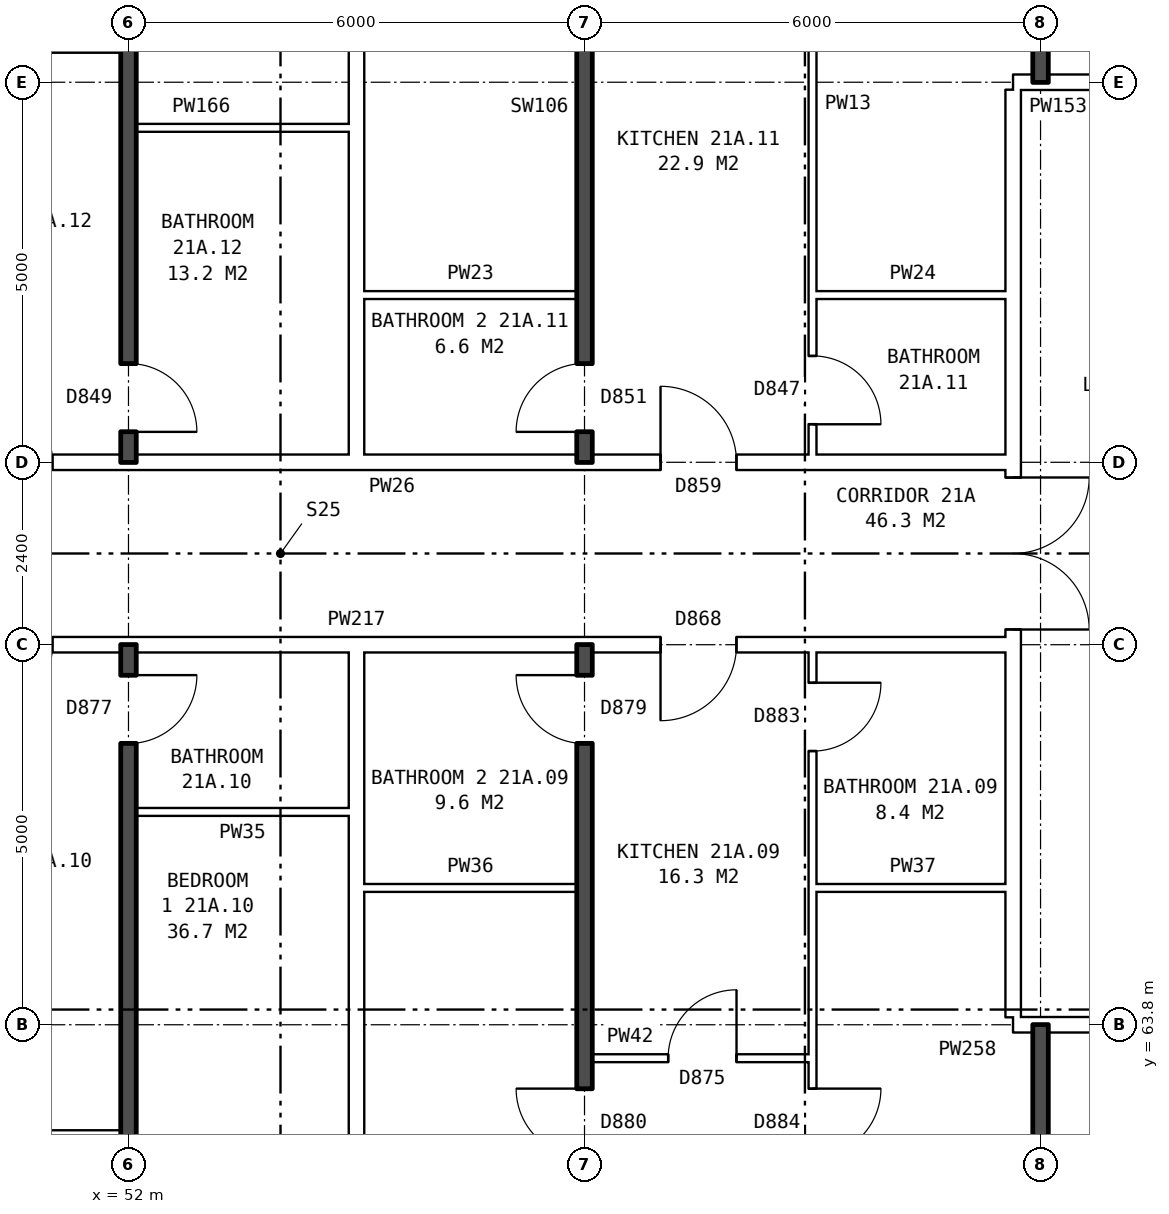
"""IFC4 building model, lengths in metres.
Left out: names, types, materials, properties, quantities, classifications, styles, units other than length and angle.
Written with IfcOpenShell. Run it as: python <this file> out.ifc"""

import sys

from ifc_helpers import new_model, si_unit, direction, frame, frame_2d, origin, place, context, subcontext, project, spatial, rectangle, extrude, element, fill, save


model = new_model("IFC4")
c1 = context("Model", 3, precision=1e-05, world=origin(), true_north=direction((0.0, 1.0)))
c2 = subcontext(c1, "Body", "Model", "MODEL_VIEW")
j1 = project(units=[si_unit("LENGTHUNIT", "METRE"), si_unit("PLANEANGLEUNIT", "RADIAN")], contexts=[c1])
p1 = place(None, origin())
s1 = spatial("IfcSite", under=j1, at=p1, CompositionType="ELEMENT")
p2 = place(p1, origin())
s2 = spatial("IfcBuilding", under=s1, at=p2, CompositionType="ELEMENT")
p3 = place(p2, frame((0.0, 0.0, 77.8)))
s3 = spatial("IfcBuildingStorey", under=s2, at=p3, CompositionType="ELEMENT", Elevation=77.8)
p4 = place(p3, frame((63.64, 63.9, 0.0), z_axis=(0.0, 0.0, 1.0), x_axis=(0.0, 1.0, 0.0)))
e1 = element("IfcWall", 1, at=p4, inside=s3, PredefinedType="PARTITIONING", context=c2, shape_type="SweptSolid", body=[
    extrude(rectangle(XDim=12.2, YDim=0.2, at=frame_2d((6.1, 0.0))), origin(), (0.0, 0.0, 1.0), 2.85),
])
p5 = place(p4, frame((5.1, 0.0, 0.0)))
e2 = element("IfcOpeningElement", 2, at=p5, cuts=e1, PredefinedType="OPENING", context=c2, shape_type="SweptSolid", body=[
    extrude(rectangle(XDim=2.0, YDim=2.1, at=frame_2d((1.0, 1.05))), frame((0.0, 0.11, 0.0), z_axis=(0.0, -1.0, 0.0), x_axis=(1.0, 0.0, 0.0)), (0.0, 0.0, 1.0), 0.22),
])
p6 = place(p3, frame((49.0, 62.36, 0.0), z_axis=(0.0, 0.0, 1.0), x_axis=(1.0, 0.0, 0.0)))
e3 = element("IfcWall", 3, at=p6, inside=s3, PredefinedType="PARTITIONING", context=c2, shape_type="SweptSolid", body=[
    extrude(rectangle(XDim=2.9, YDim=0.1, at=frame_2d((1.45, 0.0))), origin(), (0.0, 0.0, 1.0), 2.85),
])
p7 = place(p6, frame((1.0, 0.0, 0.0)))
e4 = element("IfcOpeningElement", 4, at=p7, cuts=e3, PredefinedType="OPENING", context=c2, shape_type="SweptSolid", body=[
    extrude(rectangle(XDim=0.9, YDim=2.1, at=frame_2d((0.45, 1.05))), frame((0.0, 0.06, 0.0), z_axis=(0.0, -1.0, 0.0), x_axis=(1.0, 0.0, 0.0)), (0.0, 0.0, 1.0), 0.12),
])
p8 = place(p3, frame((58.1, 63.36, 0.0), z_axis=(0.0, 0.0, 1.0), x_axis=(1.0, 0.0, 0.0)))
e5 = element("IfcWall", 5, at=p8, inside=s3, PredefinedType="PARTITIONING", context=c2, shape_type="SweptSolid", body=[
    extrude(rectangle(XDim=2.9, YDim=0.1, at=frame_2d((1.45, 0.0))), origin(), (0.0, 0.0, 1.0), 2.85),
])
p9 = place(p8, frame((1.0, 0.0, 0.0)))
e6 = element("IfcOpeningElement", 6, at=p9, cuts=e5, PredefinedType="OPENING", context=c2, shape_type="SweptSolid", body=[
    extrude(rectangle(XDim=0.9, YDim=2.1, at=frame_2d((0.45, 1.05))), frame((0.0, 0.06, 0.0), z_axis=(0.0, -1.0, 0.0), x_axis=(1.0, 0.0, 0.0)), (0.0, 0.0, 1.0), 0.12),
])
p10 = place(p3, frame((63.64, 63.8, 0.0), z_axis=(0.0, 0.0, 1.0), x_axis=(1.0, 0.0, 0.0)))
e7 = element("IfcWall", 7, at=p10, inside=s3, PredefinedType="PARTITIONING", context=c2, shape_type="SweptSolid", body=[
    extrude(rectangle(XDim=3.0, YDim=0.2, at=frame_2d((1.5, 0.0))), origin(), (0.0, 0.0, 1.0), 2.85),
])
p11 = place(p10, frame((1.18, 0.0, 0.0)))
e8 = element("IfcOpeningElement", 8, at=p11, cuts=e7, PredefinedType="OPENING", context=c2, shape_type="SweptSolid", body=[
    extrude(rectangle(XDim=1.0, YDim=2.1, at=frame_2d((0.5, 1.05))), frame((0.0, 0.11, 0.0), z_axis=(0.0, -1.0, 0.0), x_axis=(1.0, 0.0, 0.0)), (0.0, 0.0, 1.0), 0.22),
])
p12 = place(p3, frame((55.1, 65.6, 0.0), z_axis=(0.0, 0.0, 1.0), x_axis=(1.0, 0.0, 0.0)))
e9 = element("IfcWall", 9, at=p12, inside=s3, PredefinedType="PARTITIONING", context=c2, shape_type="SweptSolid", body=[
    extrude(rectangle(XDim=2.8, YDim=0.1, at=frame_2d((1.4, 0.0))), origin(), (0.0, 0.0, 1.0), 2.85),
])
p13 = place(p3, frame((61.0, 65.6, 0.0), z_axis=(0.0, 0.0, 1.0), x_axis=(1.0, 0.0, 0.0)))
e10 = element("IfcWall", 10, at=p13, inside=s3, PredefinedType="PARTITIONING", context=c2, shape_type="SweptSolid", body=[
    extrude(rectangle(XDim=2.64, YDim=0.1, at=frame_2d((1.32, 0.0))), origin(), (0.0, 0.0, 1.0), 2.85),
])
p14 = place(p3, frame((52.1, 66.6, 0.0), z_axis=(0.0, 0.0, 1.0), x_axis=(1.0, 0.0, 0.0)))
e11 = element("IfcWall", 11, at=p14, inside=s3, PredefinedType="PARTITIONING", context=c2, shape_type="SweptSolid", body=[
    extrude(rectangle(XDim=2.8, YDim=0.1, at=frame_2d((1.4, 0.0))), origin(), (0.0, 0.0, 1.0), 2.85),
])
p15 = place(p3, frame((44.36, 68.8, 0.0), z_axis=(0.0, 0.0, 1.0), x_axis=(1.0, 0.0, 0.0)))
e12 = element("IfcWall", 12, at=p15, inside=s3, PredefinedType="PARTITIONING", context=c2, shape_type="SweptSolid", body=[
    extrude(rectangle(XDim=19.28, YDim=0.2, at=frame_2d((9.64, 0.0))), origin(), (0.0, 0.0, 1.0), 2.85),
])
p16 = place(p15, frame((14.64, 0.0, 0.0)))
e13 = element("IfcOpeningElement", 13, at=p16, cuts=e12, PredefinedType="OPENING", context=c2, shape_type="SweptSolid", body=[
    extrude(rectangle(XDim=1.0, YDim=2.1, at=frame_2d((0.5, 1.05))), frame((0.0, 0.11, 0.0), z_axis=(0.0, -1.0, 0.0), x_axis=(1.0, 0.0, 0.0)), (0.0, 0.0, 1.0), 0.22),
])
p17 = place(p15, frame((5.64, 0.0, 0.0)))
e14 = element("IfcOpeningElement", 14, at=p17, cuts=e12, PredefinedType="OPENING", context=c2, shape_type="SweptSolid", body=[
    extrude(rectangle(XDim=1.0, YDim=2.1, at=frame_2d((0.5, 1.05))), frame((0.0, 0.11, 0.0), z_axis=(0.0, -1.0, 0.0), x_axis=(1.0, 0.0, 0.0)), (0.0, 0.0, 1.0), 0.22),
])
p18 = place(p3, frame((44.36, 71.2, 0.0), z_axis=(0.0, 0.0, 1.0), x_axis=(1.0, 0.0, 0.0)))
e15 = element("IfcWall", 15, at=p18, inside=s3, PredefinedType="PARTITIONING", context=c2, shape_type="SweptSolid", body=[
    extrude(rectangle(XDim=19.28, YDim=0.2, at=frame_2d((9.64, 0.0))), origin(), (0.0, 0.0, 1.0), 2.85),
])
p19 = place(p18, frame((14.64, 0.0, 0.0)))
e16 = element("IfcOpeningElement", 16, at=p19, cuts=e15, PredefinedType="OPENING", context=c2, shape_type="SweptSolid", body=[
    extrude(rectangle(XDim=1.0, YDim=2.1, at=frame_2d((0.5, 1.05))), frame((0.0, 0.11, 0.0), z_axis=(0.0, -1.0, 0.0), x_axis=(1.0, 0.0, 0.0)), (0.0, 0.0, 1.0), 0.22),
])
p20 = place(p18, frame((5.64, 0.0, 0.0)))
e17 = element("IfcOpeningElement", 17, at=p20, cuts=e15, PredefinedType="OPENING", context=c2, shape_type="SweptSolid", body=[
    extrude(rectangle(XDim=1.0, YDim=2.1, at=frame_2d((0.5, 1.05))), frame((0.0, 0.11, 0.0), z_axis=(0.0, -1.0, 0.0), x_axis=(1.0, 0.0, 0.0)), (0.0, 0.0, 1.0), 0.22),
])
p21 = place(p3, frame((55.1, 73.4, 0.0), z_axis=(0.0, 0.0, 1.0), x_axis=(1.0, 0.0, 0.0)))
e18 = element("IfcWall", 18, at=p21, inside=s3, PredefinedType="PARTITIONING", context=c2, shape_type="SweptSolid", body=[
    extrude(rectangle(XDim=2.8, YDim=0.1, at=frame_2d((1.4, 0.0))), origin(), (0.0, 0.0, 1.0), 2.85),
])
p22 = place(p3, frame((61.0, 73.4, 0.0), z_axis=(0.0, 0.0, 1.0), x_axis=(1.0, 0.0, 0.0)))
e19 = element("IfcWall", 19, at=p22, inside=s3, PredefinedType="PARTITIONING", context=c2, shape_type="SweptSolid", body=[
    extrude(rectangle(XDim=2.64, YDim=0.1, at=frame_2d((1.32, 0.0))), origin(), (0.0, 0.0, 1.0), 2.85),
])
p23 = place(p3, frame((52.1, 75.6, 0.0), z_axis=(0.0, 0.0, 1.0), x_axis=(1.0, 0.0, 0.0)))
e20 = element("IfcWall", 20, at=p23, inside=s3, PredefinedType="PARTITIONING", context=c2, shape_type="SweptSolid", body=[
    extrude(rectangle(XDim=2.8, YDim=0.1, at=frame_2d((1.4, 0.0))), origin(), (0.0, 0.0, 1.0), 2.85),
])
p24 = place(p3, frame((63.64, 76.2, 0.0), z_axis=(0.0, 0.0, 1.0), x_axis=(1.0, 0.0, 0.0)))
e21 = element("IfcWall", 21, at=p24, inside=s3, PredefinedType="PARTITIONING", context=c2, shape_type="SweptSolid", body=[
    extrude(rectangle(XDim=3.0, YDim=0.2, at=frame_2d((1.5, 0.0))), origin(), (0.0, 0.0, 1.0), 2.85),
])
p25 = place(p24, frame((1.18, 0.0, 0.0)))
e22 = element("IfcOpeningElement", 22, at=p25, cuts=e21, PredefinedType="OPENING", context=c2, shape_type="SweptSolid", body=[
    extrude(rectangle(XDim=1.0, YDim=2.1, at=frame_2d((0.5, 1.05))), frame((0.0, 0.11, 0.0), z_axis=(0.0, -1.0, 0.0), x_axis=(1.0, 0.0, 0.0)), (0.0, 0.0, 1.0), 0.22),
])
p26 = place(p3, frame((49.0, 76.64, 0.0), z_axis=(0.0, 0.0, 1.0), x_axis=(1.0, 0.0, 0.0)))
e23 = element("IfcWall", 23, at=p26, inside=s3, PredefinedType="PARTITIONING", context=c2, shape_type="SweptSolid", body=[
    extrude(rectangle(XDim=2.9, YDim=0.1, at=frame_2d((1.45, 0.0))), origin(), (0.0, 0.0, 1.0), 2.85),
])
p27 = place(p26, frame((1.0, 0.0, 0.0)))
e24 = element("IfcOpeningElement", 24, at=p27, cuts=e23, PredefinedType="OPENING", context=c2, shape_type="SweptSolid", body=[
    extrude(rectangle(XDim=0.9, YDim=2.1, at=frame_2d((0.45, 1.05))), frame((0.0, 0.06, 0.0), z_axis=(0.0, -1.0, 0.0), x_axis=(1.0, 0.0, 0.0)), (0.0, 0.0, 1.0), 0.12),
])
p28 = place(p3, frame((52.0, 54.36, 0.0), z_axis=(0.0, 0.0, 1.0), x_axis=(0.0, 1.0, 0.0)))
e25 = element("IfcWall", 25, at=p28, inside=s3, PredefinedType="SOLIDWALL", context=c2, shape_type="SweptSolid", body=[
    extrude(rectangle(XDim=14.44, YDim=0.2, at=frame_2d((7.22, 0.0))), origin(), (0.0, 0.0, 1.0), 2.85),
])
p29 = place(p28, frame((6.7, 0.0, 0.0)))
e26 = element("IfcOpeningElement", 26, at=p29, cuts=e25, PredefinedType="OPENING", context=c2, shape_type="SweptSolid", body=[
    extrude(rectangle(XDim=0.9, YDim=2.1, at=frame_2d((0.45, 1.05))), frame((0.0, 0.11, 0.0), z_axis=(0.0, -1.0, 0.0), x_axis=(1.0, 0.0, 0.0)), (0.0, 0.0, 1.0), 0.22),
])
p30 = place(p28, frame((13.14, 0.0, 0.0)))
e27 = element("IfcOpeningElement", 27, at=p30, cuts=e25, PredefinedType="OPENING", context=c2, shape_type="SweptSolid", body=[
    extrude(rectangle(XDim=0.9, YDim=2.1, at=frame_2d((0.45, 1.05))), frame((0.0, 0.11, 0.0), z_axis=(0.0, -1.0, 0.0), x_axis=(1.0, 0.0, 0.0)), (0.0, 0.0, 1.0), 0.22),
])
p31 = place(p3, frame((52.0, 71.2, 0.0), z_axis=(0.0, 0.0, 1.0), x_axis=(0.0, 1.0, 0.0)))
e28 = element("IfcWall", 28, at=p31, inside=s3, PredefinedType="SOLIDWALL", context=c2, shape_type="SweptSolid", body=[
    extrude(rectangle(XDim=14.44, YDim=0.2, at=frame_2d((7.22, 0.0))), origin(), (0.0, 0.0, 1.0), 2.85),
])
p32 = place(p31, frame((5.84, 0.0, 0.0)))
e29 = element("IfcOpeningElement", 29, at=p32, cuts=e28, PredefinedType="OPENING", context=c2, shape_type="SweptSolid", body=[
    extrude(rectangle(XDim=0.9, YDim=2.1, at=frame_2d((0.45, 1.05))), frame((0.0, 0.11, 0.0), z_axis=(0.0, -1.0, 0.0), x_axis=(1.0, 0.0, 0.0)), (0.0, 0.0, 1.0), 0.22),
])
p33 = place(p31, frame((0.4, 0.0, 0.0)))
e30 = element("IfcOpeningElement", 30, at=p33, cuts=e28, PredefinedType="OPENING", context=c2, shape_type="SweptSolid", body=[
    extrude(rectangle(XDim=0.9, YDim=2.1, at=frame_2d((0.45, 1.05))), frame((0.0, 0.11, 0.0), z_axis=(0.0, -1.0, 0.0), x_axis=(1.0, 0.0, 0.0)), (0.0, 0.0, 1.0), 0.22),
])
for number, where, z_axis, x_axis in (
    (31, (55.0, 54.36, 0.0), (0.0, 0.0, 1.0), (0.0, 1.0, 0.0)),
    (32, (55.0, 71.3, 0.0), (0.0, 0.0, 1.0), (0.0, 1.0, 0.0)),
):
    element("IfcWall", number, at=place(p3, frame(where, z_axis=z_axis, x_axis=x_axis)), inside=s3, PredefinedType="PARTITIONING", context=c2, shape_type="SweptSolid", body=[
        extrude(rectangle(XDim=14.34, YDim=0.2, at=frame_2d((7.17, 0.0))), origin(), (0.0, 0.0, 1.0), 2.85),
    ])
p34 = place(p3, frame((58.0, 54.36, 0.0), z_axis=(0.0, 0.0, 1.0), x_axis=(0.0, 1.0, 0.0)))
e33 = element("IfcWall", 33, at=p34, inside=s3, PredefinedType="SOLIDWALL", context=c2, shape_type="SweptSolid", body=[
    extrude(rectangle(XDim=14.44, YDim=0.2, at=frame_2d((7.22, 0.0))), origin(), (0.0, 0.0, 1.0), 2.85),
])
p35 = place(p34, frame((7.7, 0.0, 0.0)))
e34 = element("IfcOpeningElement", 34, at=p35, cuts=e33, PredefinedType="OPENING", context=c2, shape_type="SweptSolid", body=[
    extrude(rectangle(XDim=0.9, YDim=2.1, at=frame_2d((0.45, 1.05))), frame((0.0, 0.11, 0.0), z_axis=(0.0, -1.0, 0.0), x_axis=(1.0, 0.0, 0.0)), (0.0, 0.0, 1.0), 0.22),
])
p36 = place(p34, frame((13.14, 0.0, 0.0)))
e35 = element("IfcOpeningElement", 35, at=p36, cuts=e33, PredefinedType="OPENING", context=c2, shape_type="SweptSolid", body=[
    extrude(rectangle(XDim=0.9, YDim=2.1, at=frame_2d((0.45, 1.05))), frame((0.0, 0.11, 0.0), z_axis=(0.0, -1.0, 0.0), x_axis=(1.0, 0.0, 0.0)), (0.0, 0.0, 1.0), 0.22),
])
p37 = place(p3, frame((58.0, 71.2, 0.0), z_axis=(0.0, 0.0, 1.0), x_axis=(0.0, 1.0, 0.0)))
e36 = element("IfcWall", 36, at=p37, inside=s3, PredefinedType="SOLIDWALL", context=c2, shape_type="SweptSolid", body=[
    extrude(rectangle(XDim=14.44, YDim=0.2, at=frame_2d((7.22, 0.0))), origin(), (0.0, 0.0, 1.0), 2.85),
])
p38 = place(p37, frame((8.04, 0.0, 0.0)))
e37 = element("IfcOpeningElement", 37, at=p38, cuts=e36, PredefinedType="OPENING", context=c2, shape_type="SweptSolid", body=[
    extrude(rectangle(XDim=0.9, YDim=2.1, at=frame_2d((0.45, 1.05))), frame((0.0, 0.11, 0.0), z_axis=(0.0, -1.0, 0.0), x_axis=(1.0, 0.0, 0.0)), (0.0, 0.0, 1.0), 0.22),
])
p39 = place(p37, frame((0.4, 0.0, 0.0)))
e38 = element("IfcOpeningElement", 38, at=p39, cuts=e36, PredefinedType="OPENING", context=c2, shape_type="SweptSolid", body=[
    extrude(rectangle(XDim=0.9, YDim=2.1, at=frame_2d((0.45, 1.05))), frame((0.0, 0.11, 0.0), z_axis=(0.0, -1.0, 0.0), x_axis=(1.0, 0.0, 0.0)), (0.0, 0.0, 1.0), 0.22),
])
p40 = place(p3, frame((61.0, 54.36, 0.0), z_axis=(0.0, 0.0, 1.0), x_axis=(0.0, 1.0, 0.0)))
e39 = element("IfcWall", 39, at=p40, inside=s3, PredefinedType="PARTITIONING", context=c2, shape_type="SweptSolid", body=[
    extrude(rectangle(XDim=14.34, YDim=0.1, at=frame_2d((7.17, 0.0))), origin(), (0.0, 0.0, 1.0), 2.85),
])
p41 = place(p40, frame((7.7, 0.0, 0.0)))
e40 = element("IfcOpeningElement", 40, at=p41, cuts=e39, PredefinedType="OPENING", context=c2, shape_type="SweptSolid", body=[
    extrude(rectangle(XDim=0.9, YDim=2.1, at=frame_2d((0.45, 1.05))), frame((0.0, 0.06, 0.0), z_axis=(0.0, -1.0, 0.0), x_axis=(1.0, 0.0, 0.0)), (0.0, 0.0, 1.0), 0.12),
])
p42 = place(p40, frame((13.04, 0.0, 0.0)))
e41 = element("IfcOpeningElement", 41, at=p42, cuts=e39, PredefinedType="OPENING", context=c2, shape_type="SweptSolid", body=[
    extrude(rectangle(XDim=0.9, YDim=2.1, at=frame_2d((0.45, 1.05))), frame((0.0, 0.06, 0.0), z_axis=(0.0, -1.0, 0.0), x_axis=(1.0, 0.0, 0.0)), (0.0, 0.0, 1.0), 0.12),
])
p43 = place(p3, frame((61.0, 71.3, 0.0), z_axis=(0.0, 0.0, 1.0), x_axis=(0.0, 1.0, 0.0)))
e42 = element("IfcWall", 42, at=p43, inside=s3, PredefinedType="PARTITIONING", context=c2, shape_type="SweptSolid", body=[
    extrude(rectangle(XDim=14.34, YDim=0.1, at=frame_2d((7.17, 0.0))), origin(), (0.0, 0.0, 1.0), 2.85),
])
p44 = place(p43, frame((7.94, 0.0, 0.0)))
e43 = element("IfcOpeningElement", 43, at=p44, cuts=e42, PredefinedType="OPENING", context=c2, shape_type="SweptSolid", body=[
    extrude(rectangle(XDim=0.9, YDim=2.1, at=frame_2d((0.45, 1.05))), frame((0.0, 0.06, 0.0), z_axis=(0.0, -1.0, 0.0), x_axis=(1.0, 0.0, 0.0)), (0.0, 0.0, 1.0), 0.12),
])
p45 = place(p43, frame((0.4, 0.0, 0.0)))
e44 = element("IfcOpeningElement", 44, at=p45, cuts=e42, PredefinedType="OPENING", context=c2, shape_type="SweptSolid", body=[
    extrude(rectangle(XDim=0.9, YDim=2.1, at=frame_2d((0.45, 1.05))), frame((0.0, 0.06, 0.0), z_axis=(0.0, -1.0, 0.0), x_axis=(1.0, 0.0, 0.0)), (0.0, 0.0, 1.0), 0.12),
])
for number, where, z_axis, x_axis in (
    (45, (64.0, 54.36, 0.0), (0.0, 0.0, 1.0), (0.0, 1.0, 0.0)),
    (46, (64.0, 76.2, 0.0), (0.0, 0.0, 1.0), (0.0, 1.0, 0.0)),
):
    element("IfcWall", number, at=place(p3, frame(where, z_axis=z_axis, x_axis=x_axis)), inside=s3, PredefinedType="SOLIDWALL", context=c2, shape_type="SweptSolid", body=[
        extrude(rectangle(XDim=9.44, YDim=0.2, at=frame_2d((4.72, 0.0))), origin(), (0.0, 0.0, 1.0), 2.85),
    ])
p46 = place(p5, frame((2.0, 0.0, 0.0), z_axis=(0.0, 0.0, 1.0), x_axis=(-1.0, 0.0, 0.0)))
e47 = element("IfcDoor", 47, at=p46, inside=s3, OperationType="DOUBLE_DOOR_SINGLE_SWING", PredefinedType="DOOR", context=c2, shape_type="SweptSolid", body=[
    extrude(rectangle(XDim=2.0, YDim=2.1, at=frame_2d((1.0, 1.05))), frame((0.0, 0.025, 0.0), z_axis=(0.0, -1.0, 0.0), x_axis=(1.0, 0.0, 0.0)), (0.0, 0.0, 1.0), 0.05),
])
fill(e2, e47)
p47 = place(p41, frame((0.9, 0.0, 0.0), z_axis=(0.0, 0.0, 1.0), x_axis=(-1.0, 0.0, 0.0)))
e48 = element("IfcDoor", 48, at=p47, inside=s3, OperationType="SINGLE_SWING_LEFT", PredefinedType="DOOR", context=c2, shape_type="SweptSolid", body=[
    extrude(rectangle(XDim=0.9, YDim=2.1, at=frame_2d((0.45, 1.05))), frame((0.0, 0.025, 0.0), z_axis=(0.0, -1.0, 0.0), x_axis=(1.0, 0.0, 0.0)), (0.0, 0.0, 1.0), 0.05),
])
fill(e40, e48)
p48 = place(p35, origin())
e49 = element("IfcDoor", 49, at=p48, inside=s3, OperationType="SINGLE_SWING_RIGHT", PredefinedType="DOOR", context=c2, shape_type="SweptSolid", body=[
    extrude(rectangle(XDim=0.9, YDim=2.1, at=frame_2d((0.45, 1.05))), frame((0.0, 0.025, 0.0), z_axis=(0.0, -1.0, 0.0), x_axis=(1.0, 0.0, 0.0)), (0.0, 0.0, 1.0), 0.05),
])
fill(e34, e49)
p49 = place(p16, frame((1.0, 0.0, 0.0), z_axis=(0.0, 0.0, 1.0), x_axis=(-1.0, 0.0, 0.0)))
e50 = element("IfcDoor", 50, at=p49, inside=s3, OperationType="SINGLE_SWING_RIGHT", PredefinedType="DOOR", context=c2, shape_type="SweptSolid", body=[
    extrude(rectangle(XDim=1.0, YDim=2.1, at=frame_2d((0.5, 1.05))), frame((0.0, 0.025, 0.0), z_axis=(0.0, -1.0, 0.0), x_axis=(1.0, 0.0, 0.0)), (0.0, 0.0, 1.0), 0.05),
])
fill(e13, e50)
p50 = place(p9, origin())
e51 = element("IfcDoor", 51, at=p50, inside=s3, OperationType="SINGLE_SWING_RIGHT", PredefinedType="DOOR", context=c2, shape_type="SweptSolid", body=[
    extrude(rectangle(XDim=0.9, YDim=2.1, at=frame_2d((0.45, 1.05))), frame((0.0, 0.025, 0.0), z_axis=(0.0, -1.0, 0.0), x_axis=(1.0, 0.0, 0.0)), (0.0, 0.0, 1.0), 0.05),
])
fill(e6, e51)
p51 = place(p42, frame((0.9, 0.0, 0.0), z_axis=(0.0, 0.0, 1.0), x_axis=(-1.0, 0.0, 0.0)))
e52 = element("IfcDoor", 52, at=p51, inside=s3, OperationType="SINGLE_SWING_LEFT", PredefinedType="DOOR", context=c2, shape_type="SweptSolid", body=[
    extrude(rectangle(XDim=0.9, YDim=2.1, at=frame_2d((0.45, 1.05))), frame((0.0, 0.025, 0.0), z_axis=(0.0, -1.0, 0.0), x_axis=(1.0, 0.0, 0.0)), (0.0, 0.0, 1.0), 0.05),
])
fill(e41, e52)
p52 = place(p36, origin())
e53 = element("IfcDoor", 53, at=p52, inside=s3, OperationType="SINGLE_SWING_RIGHT", PredefinedType="DOOR", context=c2, shape_type="SweptSolid", body=[
    extrude(rectangle(XDim=0.9, YDim=2.1, at=frame_2d((0.45, 1.05))), frame((0.0, 0.025, 0.0), z_axis=(0.0, -1.0, 0.0), x_axis=(1.0, 0.0, 0.0)), (0.0, 0.0, 1.0), 0.05),
])
fill(e35, e53)
p53 = place(p30, frame((0.9, 0.0, 0.0), z_axis=(0.0, 0.0, 1.0), x_axis=(-1.0, 0.0, 0.0)))
e54 = element("IfcDoor", 54, at=p53, inside=s3, OperationType="SINGLE_SWING_LEFT", PredefinedType="DOOR", context=c2, shape_type="SweptSolid", body=[
    extrude(rectangle(XDim=0.9, YDim=2.1, at=frame_2d((0.45, 1.05))), frame((0.0, 0.025, 0.0), z_axis=(0.0, -1.0, 0.0), x_axis=(1.0, 0.0, 0.0)), (0.0, 0.0, 1.0), 0.05),
])
fill(e27, e54)
p54 = place(p19, origin())
e55 = element("IfcDoor", 55, at=p54, inside=s3, OperationType="SINGLE_SWING_LEFT", PredefinedType="DOOR", context=c2, shape_type="SweptSolid", body=[
    extrude(rectangle(XDim=1.0, YDim=2.1, at=frame_2d((0.5, 1.05))), frame((0.0, 0.025, 0.0), z_axis=(0.0, -1.0, 0.0), x_axis=(1.0, 0.0, 0.0)), (0.0, 0.0, 1.0), 0.05),
])
fill(e16, e55)
p55 = place(p45, frame((0.9, 0.0, 0.0), z_axis=(0.0, 0.0, 1.0), x_axis=(-1.0, 0.0, 0.0)))
e56 = element("IfcDoor", 56, at=p55, inside=s3, OperationType="SINGLE_SWING_RIGHT", PredefinedType="DOOR", context=c2, shape_type="SweptSolid", body=[
    extrude(rectangle(XDim=0.9, YDim=2.1, at=frame_2d((0.45, 1.05))), frame((0.0, 0.025, 0.0), z_axis=(0.0, -1.0, 0.0), x_axis=(1.0, 0.0, 0.0)), (0.0, 0.0, 1.0), 0.05),
])
fill(e44, e56)
p56 = place(p39, origin())
e57 = element("IfcDoor", 57, at=p56, inside=s3, OperationType="SINGLE_SWING_LEFT", PredefinedType="DOOR", context=c2, shape_type="SweptSolid", body=[
    extrude(rectangle(XDim=0.9, YDim=2.1, at=frame_2d((0.45, 1.05))), frame((0.0, 0.025, 0.0), z_axis=(0.0, -1.0, 0.0), x_axis=(1.0, 0.0, 0.0)), (0.0, 0.0, 1.0), 0.05),
])
fill(e38, e57)
p57 = place(p33, frame((0.9, 0.0, 0.0), z_axis=(0.0, 0.0, 1.0), x_axis=(-1.0, 0.0, 0.0)))
e58 = element("IfcDoor", 58, at=p57, inside=s3, OperationType="SINGLE_SWING_RIGHT", PredefinedType="DOOR", context=c2, shape_type="SweptSolid", body=[
    extrude(rectangle(XDim=0.9, YDim=2.1, at=frame_2d((0.45, 1.05))), frame((0.0, 0.025, 0.0), z_axis=(0.0, -1.0, 0.0), x_axis=(1.0, 0.0, 0.0)), (0.0, 0.0, 1.0), 0.05),
])
fill(e30, e58)
save(model, sys.argv[1])
